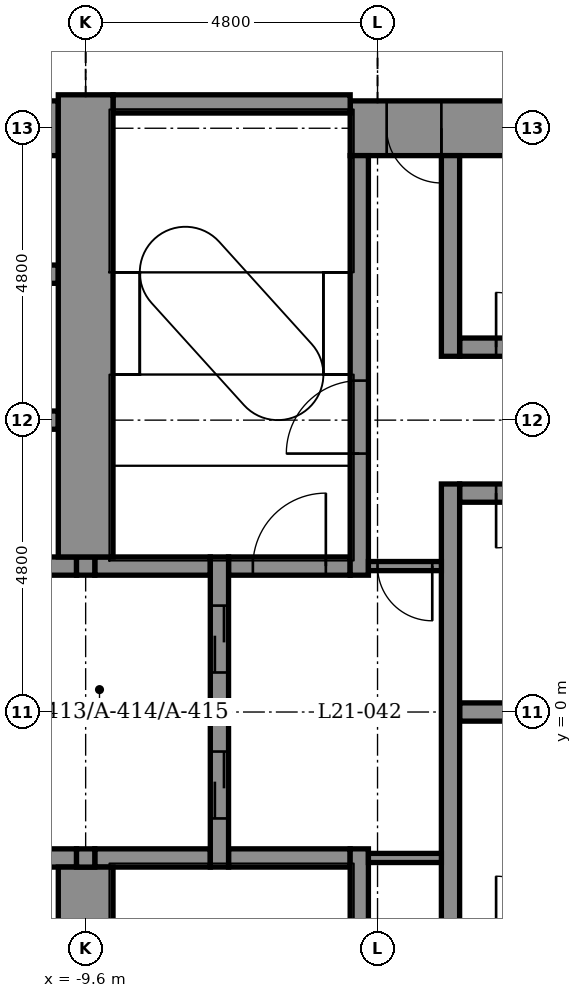
"""IFC4 building model, lengths in metres.
Left out: names, types, materials, properties, quantities, classifications, styles, units other than length and angle.
Written with IfcOpenShell. Run it as: python <this file> out.ifc"""

import sys

from ifc_helpers import new_model, si_unit, direction, frame, frame_2d, origin, place, context, subcontext, project, spatial, rectangle, extrude, element, fill, save


model = new_model("IFC4")
c1 = context("Model", 3, precision=1e-05, world=origin(), true_north=direction((0.0, 1.0)))
c2 = subcontext(c1, "Body", "Model", "MODEL_VIEW")
j1 = project(units=[si_unit("LENGTHUNIT", "METRE"), si_unit("PLANEANGLEUNIT", "RADIAN")], contexts=[c1])
p1 = place(None, origin())
s1 = spatial("IfcSite", under=j1, at=p1, CompositionType="ELEMENT")
p2 = place(p1, origin())
s2 = spatial("IfcBuilding", under=s1, at=p2, CompositionType="ELEMENT")
p3 = place(p2, frame((0.0, 0.0, 109.4)))
s3 = spatial("IfcBuildingStorey", under=s2, at=p3, CompositionType="ELEMENT", Elevation=109.4)
p4 = place(p3, frame((-10.85, -2.4, -0.2), z_axis=(0.0, 0.0, 1.0), x_axis=(1.0, 0.0, 0.0)))
e1 = element("IfcWall", 1, at=p4, inside=s3, PredefinedType="STANDARD", context=c2, shape_type="SweptSolid", body=[
    extrude(rectangle(XDim=1.1, YDim=0.3, at=frame_2d((0.55, 0.0))), origin(), (0.0, 0.0, 1.0), 4.5),
])
p5 = place(p3, frame((-9.45, -2.4, -0.2), z_axis=(0.0, 0.0, 1.0), x_axis=(1.0, 0.0, 0.0)))
e2 = element("IfcWall", 2, at=p5, inside=s3, PredefinedType="STANDARD", context=c2, shape_type="SweptSolid", body=[
    extrude(rectangle(XDim=1.9, YDim=0.3, at=frame_2d((0.95, 0.0))), origin(), (0.0, 0.0, 1.0), 4.5),
])
p6 = place(p3, frame((-7.25, -2.4, -0.2), z_axis=(0.0, 0.0, 1.0), x_axis=(1.0, 0.0, 0.0)))
e3 = element("IfcWall", 3, at=p6, inside=s3, PredefinedType="STANDARD", context=c2, shape_type="SweptSolid", body=[
    extrude(rectangle(XDim=2.0, YDim=0.3, at=frame_2d((1.0, 0.0))), origin(), (0.0, 0.0, 1.0), 4.5),
])
p7 = place(p3, frame((-10.85, 0.0, -0.2), z_axis=(0.0, 0.0, 1.0), x_axis=(1.0, 0.0, 0.0)))
e4 = element("IfcWall", 4, at=p7, inside=s3, PredefinedType="STANDARD", context=c2, shape_type="SweptSolid", body=[
    extrude(rectangle(XDim=3.3, YDim=0.3, at=frame_2d((1.65, 0.0))), origin(), (0.0, 0.0, 1.0), 4.5),
])
p8 = place(p3, frame((-3.45, 0.0, -0.2), z_axis=(0.0, 0.0, 1.0), x_axis=(1.0, 0.0, 0.0)))
e5 = element("IfcWall", 5, at=p8, inside=s3, PredefinedType="STANDARD", context=c2, shape_type="SweptSolid", body=[
    extrude(rectangle(XDim=2.1, YDim=0.3, at=frame_2d((1.05, 0.0))), origin(), (0.0, 0.0, 1.0), 4.5),
])
p9 = place(p3, frame((-10.85, 2.4, -0.2), z_axis=(0.0, 0.0, 1.0), x_axis=(1.0, 0.0, 0.0)))
e6 = element("IfcWall", 6, at=p9, inside=s3, PredefinedType="STANDARD", context=c2, shape_type="SweptSolid", body=[
    extrude(rectangle(XDim=1.1, YDim=0.3, at=frame_2d((0.55, 0.0))), origin(), (0.0, 0.0, 1.0), 4.5),
])
p10 = place(p3, frame((-9.45, 2.4, -0.2), z_axis=(0.0, 0.0, 1.0), x_axis=(1.0, 0.0, 0.0)))
e7 = element("IfcWall", 7, at=p10, inside=s3, PredefinedType="STANDARD", context=c2, shape_type="SweptSolid", body=[
    extrude(rectangle(XDim=1.9, YDim=0.3, at=frame_2d((0.95, 0.0))), origin(), (0.0, 0.0, 1.0), 4.5),
])
p11 = place(p3, frame((-7.25, 2.4, -0.2), z_axis=(0.0, 0.0, 1.0), x_axis=(1.0, 0.0, 0.0)))
e8 = element("IfcWall", 8, at=p11, inside=s3, PredefinedType="STANDARD", context=c2, shape_type="SweptSolid", body=[
    extrude(rectangle(XDim=2.0, YDim=0.3, at=frame_2d((1.0, 0.0))), origin(), (0.0, 0.0, 1.0), 4.5),
])
p12 = place(p11, frame((0.4, 0.0, 0.2)))
e9 = element("IfcOpeningElement", 9, at=p12, cuts=e8, PredefinedType="OPENING", context=c2, shape_type="SweptSolid", body=[
    extrude(rectangle(XDim=1.2, YDim=2.1, at=frame_2d((0.6, 1.05))), frame((0.0, 0.16, 0.0), z_axis=(0.0, -1.0, 0.0), x_axis=(1.0, 0.0, 0.0)), (0.0, 0.0, 1.0), 0.32),
])
p13 = place(p3, frame((-3.45, 3.6, -0.2), z_axis=(0.0, 0.0, 1.0), x_axis=(1.0, 0.0, 0.0)))
e10 = element("IfcWall", 10, at=p13, inside=s3, PredefinedType="STANDARD", context=c2, shape_type="SweptSolid", body=[
    extrude(rectangle(XDim=2.1, YDim=0.3, at=frame_2d((1.05, 0.0))), origin(), (0.0, 0.0, 1.0), 4.5),
])
p14 = place(p13, frame((0.6, 0.0, 0.2)))
e11 = element("IfcOpeningElement", 11, at=p14, cuts=e10, PredefinedType="OPENING", context=c2, shape_type="SweptSolid", body=[
    extrude(rectangle(XDim=0.9, YDim=2.1, at=frame_2d((0.45, 1.05))), frame((0.0, 0.16, 0.0), z_axis=(0.0, -1.0, 0.0), x_axis=(1.0, 0.0, 0.0)), (0.0, 0.0, 1.0), 0.32),
])
p15 = place(p3, frame((-13.95, 4.8, -0.2), z_axis=(0.0, 0.0, 1.0), x_axis=(1.0, 0.0, 0.0)))
e12 = element("IfcWall", 12, at=p15, inside=s3, PredefinedType="STANDARD", context=c2, shape_type="SweptSolid", body=[
    extrude(rectangle(XDim=3.9, YDim=0.3, at=frame_2d((1.95, 0.0))), origin(), (0.0, 0.0, 1.0), 4.5),
])
p16 = place(p3, frame((-3.45, 6.0, -0.2), z_axis=(0.0, 0.0, 1.0), x_axis=(1.0, 0.0, 0.0)))
e13 = element("IfcWall", 13, at=p16, inside=s3, PredefinedType="STANDARD", context=c2, shape_type="SweptSolid", body=[
    extrude(rectangle(XDim=2.1, YDim=0.3, at=frame_2d((1.05, 0.0))), origin(), (0.0, 0.0, 1.0), 4.5),
])
p17 = place(p16, frame((0.6, 0.0, 0.2)))
e14 = element("IfcOpeningElement", 14, at=p17, cuts=e13, PredefinedType="OPENING", context=c2, shape_type="SweptSolid", body=[
    extrude(rectangle(XDim=0.9, YDim=2.1, at=frame_2d((0.45, 1.05))), frame((0.0, 0.16, 0.0), z_axis=(0.0, -1.0, 0.0), x_axis=(1.0, 0.0, 0.0)), (0.0, 0.0, 1.0), 0.32),
])
p18 = place(p3, frame((-13.95, 7.2, -0.2), z_axis=(0.0, 0.0, 1.0), x_axis=(1.0, 0.0, 0.0)))
e15 = element("IfcWall", 15, at=p18, inside=s3, PredefinedType="STANDARD", context=c2, shape_type="SweptSolid", body=[
    extrude(rectangle(XDim=3.9, YDim=0.3, at=frame_2d((1.95, 0.0))), origin(), (0.0, 0.0, 1.0), 4.5),
])
p19 = place(p3, frame((-13.95, 9.6, -0.2), z_axis=(0.0, 0.0, 1.0), x_axis=(1.0, 0.0, 0.0)))
e16 = element("IfcWall", 16, at=p19, inside=s3, PredefinedType="SHEAR", context=c2, shape_type="SweptSolid", body=[
    extrude(rectangle(XDim=3.9, YDim=0.9, at=frame_2d((1.95, 0.0))), origin(), (0.0, 0.0, 1.0), 4.5),
])
p20 = place(p19, frame((0.05, 0.0, 0.2)))
e17 = element("IfcOpeningElement", 17, at=p20, cuts=e16, PredefinedType="OPENING", context=c2, shape_type="SweptSolid", body=[
    extrude(rectangle(XDim=0.9, YDim=2.1, at=frame_2d((0.45, 1.05))), frame((0.0, 0.46, 0.0), z_axis=(0.0, -1.0, 0.0), x_axis=(1.0, 0.0, 0.0)), (0.0, 0.0, 1.0), 0.92),
])
p21 = place(p19, frame((2.3, 0.0, 0.2)))
e18 = element("IfcOpeningElement", 18, at=p21, cuts=e16, PredefinedType="OPENING", context=c2, shape_type="SweptSolid", body=[
    extrude(rectangle(XDim=0.9, YDim=2.1, at=frame_2d((0.45, 1.05))), frame((0.0, 0.46, 0.0), z_axis=(0.0, -1.0, 0.0), x_axis=(1.0, 0.0, 0.0)), (0.0, 0.0, 1.0), 0.92),
])
p22 = place(p3, frame((-5.25, 9.6, -0.2), z_axis=(0.0, 0.0, 1.0), x_axis=(1.0, 0.0, 0.0)))
e19 = element("IfcWall", 19, at=p22, inside=s3, PredefinedType="SHEAR", context=c2, shape_type="SweptSolid", body=[
    extrude(rectangle(XDim=14.4, YDim=0.9, at=frame_2d((7.2, 0.0))), origin(), (0.0, 0.0, 1.0), 4.5),
])
p23 = place(p22, frame((0.6, 0.0, 0.2)))
e20 = element("IfcOpeningElement", 20, at=p23, cuts=e19, PredefinedType="OPENING", context=c2, shape_type="SweptSolid", body=[
    extrude(rectangle(XDim=0.9, YDim=2.1, at=frame_2d((0.45, 1.05))), frame((0.0, 0.46, 0.0), z_axis=(0.0, -1.0, 0.0), x_axis=(1.0, 0.0, 0.0)), (0.0, 0.0, 1.0), 0.92),
])
p24 = place(p3, frame((-9.15, 10.0, -0.2), z_axis=(0.0, 0.0, 1.0), x_axis=(1.0, 0.0, 0.0)))
e21 = element("IfcWall", 21, at=p24, inside=s3, PredefinedType="STANDARD", context=c2, shape_type="SweptSolid", body=[
    extrude(rectangle(XDim=3.9, YDim=0.3, at=frame_2d((1.95, 0.0))), origin(), (0.0, 0.0, 1.0), 4.5),
])
p25 = place(p3, frame((-9.6, -10.15, -0.2), z_axis=(0.0, 0.0, 1.0), x_axis=(0.0, 1.0, 0.0)))
e22 = element("IfcWall", 22, at=p25, inside=s3, PredefinedType="SHEAR", context=c2, shape_type="SweptSolid", body=[
    extrude(rectangle(XDim=7.6, YDim=0.9, at=frame_2d((3.8, 0.0))), origin(), (0.0, 0.0, 1.0), 4.5),
])
for number, where, z_axis, x_axis in (
    (23, (-9.6, -2.55, -0.2), (0.0, 0.0, 1.0), (0.0, 1.0, 0.0)),
    (24, (-9.6, 2.25, -0.2), (0.0, 0.0, 1.0), (0.0, 1.0, 0.0)),
):
    element("IfcWall", number, at=place(p3, frame(where, z_axis=z_axis, x_axis=x_axis)), inside=s3, PredefinedType="STANDARD", context=c2, shape_type="SweptSolid", body=[
        extrude(rectangle(XDim=0.3, YDim=0.3, at=frame_2d((0.15, 0.0))), origin(), (0.0, 0.0, 1.0), 4.5),
    ])
p26 = place(p3, frame((-9.6, 2.55, -0.2), z_axis=(0.0, 0.0, 1.0), x_axis=(0.0, 1.0, 0.0)))
e25 = element("IfcWall", 25, at=p26, inside=s3, PredefinedType="SHEAR", context=c2, shape_type="SweptSolid", body=[
    extrude(rectangle(XDim=7.6, YDim=0.9, at=frame_2d((3.8, 0.0))), origin(), (0.0, 0.0, 1.0), 4.5),
])
p27 = place(p3, frame((-7.4, -2.55, -0.2), z_axis=(0.0, 0.0, 1.0), x_axis=(0.0, 1.0, 0.0)))
e26 = element("IfcWall", 26, at=p27, inside=s3, PredefinedType="STANDARD", context=c2, shape_type="SweptSolid", body=[
    extrude(rectangle(XDim=5.1, YDim=0.3, at=frame_2d((2.55, 0.0))), origin(), (0.0, 0.0, 1.0), 4.5),
])
p28 = place(p27, frame((0.8, 0.0, 0.2)))
e27 = element("IfcOpeningElement", 27, at=p28, cuts=e26, PredefinedType="OPENING", context=c2, shape_type="SweptSolid", body=[
    extrude(rectangle(XDim=1.1, YDim=2.1, at=frame_2d((0.55, 1.05))), frame((0.0, 0.16, 0.0), z_axis=(0.0, -1.0, 0.0), x_axis=(1.0, 0.0, 0.0)), (0.0, 0.0, 1.0), 0.32),
])
p29 = place(p27, frame((3.2, 0.0, 0.2)))
e28 = element("IfcOpeningElement", 28, at=p29, cuts=e26, PredefinedType="OPENING", context=c2, shape_type="SweptSolid", body=[
    extrude(rectangle(XDim=1.1, YDim=2.1, at=frame_2d((0.55, 1.05))), frame((0.0, 0.16, 0.0), z_axis=(0.0, -1.0, 0.0), x_axis=(1.0, 0.0, 0.0)), (0.0, 0.0, 1.0), 0.32),
])
p30 = place(p3, frame((-5.1, -9.15, -0.2), z_axis=(0.0, 0.0, 1.0), x_axis=(0.0, 1.0, 0.0)))
e29 = element("IfcWall", 29, at=p30, inside=s3, PredefinedType="STANDARD", context=c2, shape_type="SweptSolid", body=[
    extrude(rectangle(XDim=6.9, YDim=0.3, at=frame_2d((3.45, 0.0))), origin(), (0.0, 0.0, 1.0), 4.5),
])
p31 = place(p30, frame((3.7, 0.0, 0.2)))
e30 = element("IfcOpeningElement", 30, at=p31, cuts=e29, PredefinedType="OPENING", context=c2, shape_type="SweptSolid", body=[
    extrude(rectangle(XDim=1.2, YDim=2.1, at=frame_2d((0.6, 1.05))), frame((0.0, 0.16, 0.0), z_axis=(0.0, -1.0, 0.0), x_axis=(1.0, 0.0, 0.0)), (0.0, 0.0, 1.0), 0.32),
])
p32 = place(p3, frame((-5.1, 2.25, -0.2), z_axis=(0.0, 0.0, 1.0), x_axis=(0.0, 1.0, 0.0)))
e31 = element("IfcWall", 31, at=p32, inside=s3, PredefinedType="STANDARD", context=c2, shape_type="SweptSolid", body=[
    extrude(rectangle(XDim=6.9, YDim=0.3, at=frame_2d((3.45, 0.0))), origin(), (0.0, 0.0, 1.0), 4.5),
])
p33 = place(p32, frame((2.0, 0.0, 0.2)))
e32 = element("IfcOpeningElement", 32, at=p33, cuts=e31, PredefinedType="OPENING", context=c2, shape_type="SweptSolid", body=[
    extrude(rectangle(XDim=1.2, YDim=2.1, at=frame_2d((0.6, 1.05))), frame((0.0, 0.16, 0.0), z_axis=(0.0, -1.0, 0.0), x_axis=(1.0, 0.0, 0.0)), (0.0, 0.0, 1.0), 0.32),
])
p34 = place(p3, frame((-3.6, -3.75, -0.2), z_axis=(0.0, 0.0, 1.0), x_axis=(0.0, 1.0, 0.0)))
e33 = element("IfcWall", 33, at=p34, inside=s3, PredefinedType="STANDARD", context=c2, shape_type="SweptSolid", body=[
    extrude(rectangle(XDim=7.5, YDim=0.3, at=frame_2d((3.75, 0.0))), origin(), (0.0, 0.0, 1.0), 4.5),
])
p35 = place(p3, frame((-3.6, 5.85, -0.2), z_axis=(0.0, 0.0, 1.0), x_axis=(0.0, 1.0, 0.0)))
e34 = element("IfcWall", 34, at=p35, inside=s3, PredefinedType="STANDARD", context=c2, shape_type="SweptSolid", body=[
    extrude(rectangle(XDim=3.3, YDim=0.3, at=frame_2d((1.65, 0.0))), origin(), (0.0, 0.0, 1.0), 4.5),
])
p36 = place(p3, frame((-4.95, 2.4, 0.0), z_axis=(0.0, 0.0, 1.0), x_axis=(1.0, 0.0, 0.0)))
e35 = element("IfcWall", 35, at=p36, inside=s3, PredefinedType="PARTITIONING", context=c2, shape_type="SweptSolid", body=[
    extrude(rectangle(XDim=1.2, YDim=0.15, at=frame_2d((0.6, 0.0))), origin(), (0.0, 0.0, 1.0), 4.3),
])
p37 = place(p36, frame((0.15, 0.0, 0.0)))
e36 = element("IfcOpeningElement", 36, at=p37, cuts=e35, PredefinedType="OPENING", context=c2, shape_type="SweptSolid", body=[
    extrude(rectangle(XDim=0.9, YDim=2.1, at=frame_2d((0.45, 1.05))), frame((0.0, 0.085, 0.0), z_axis=(0.0, -1.0, 0.0), x_axis=(1.0, 0.0, 0.0)), (0.0, 0.0, 1.0), 0.17),
])
p38 = place(p3, frame((-4.95, -2.4, 0.0), z_axis=(0.0, 0.0, 1.0), x_axis=(1.0, 0.0, 0.0)))
e37 = element("IfcWall", 37, at=p38, inside=s3, PredefinedType="PARTITIONING", context=c2, shape_type="SweptSolid", body=[
    extrude(rectangle(XDim=1.2, YDim=0.15, at=frame_2d((0.6, 0.0))), origin(), (0.0, 0.0, 1.0), 4.3),
])
p39 = place(p28, origin())
e38 = element("IfcDoor", 38, at=p39, inside=s3, OperationType="DOUBLE_DOOR_SLIDING", PredefinedType="DOOR", context=c2, shape_type="SweptSolid", body=[
    extrude(rectangle(XDim=1.1, YDim=2.1, at=frame_2d((0.55, 1.05))), frame((0.0, 0.025, 0.0), z_axis=(0.0, -1.0, 0.0), x_axis=(1.0, 0.0, 0.0)), (0.0, 0.0, 1.0), 0.05),
])
fill(e27, e38)
p40 = place(p29, origin())
e39 = element("IfcDoor", 39, at=p40, inside=s3, OperationType="DOUBLE_DOOR_SLIDING", PredefinedType="DOOR", context=c2, shape_type="SweptSolid", body=[
    extrude(rectangle(XDim=1.1, YDim=2.1, at=frame_2d((0.55, 1.05))), frame((0.0, 0.025, 0.0), z_axis=(0.0, -1.0, 0.0), x_axis=(1.0, 0.0, 0.0)), (0.0, 0.0, 1.0), 0.05),
])
fill(e28, e39)
p41 = place(p33, origin())
e40 = element("IfcDoor", 40, at=p41, inside=s3, OperationType="SINGLE_SWING_LEFT", PredefinedType="DOOR", context=c2, shape_type="SweptSolid", body=[
    extrude(rectangle(XDim=1.2, YDim=2.1, at=frame_2d((0.6, 1.05))), frame((0.0, 0.025, 0.0), z_axis=(0.0, -1.0, 0.0), x_axis=(1.0, 0.0, 0.0)), (0.0, 0.0, 1.0), 0.05),
])
fill(e32, e40)
p42 = place(p17, origin())
e41 = element("IfcDoor", 41, at=p42, inside=s3, OperationType="SINGLE_SWING_LEFT", PredefinedType="DOOR", context=c2, shape_type="SweptSolid", body=[
    extrude(rectangle(XDim=0.9, YDim=2.1, at=frame_2d((0.45, 1.05))), frame((0.0, 0.025, 0.0), z_axis=(0.0, -1.0, 0.0), x_axis=(1.0, 0.0, 0.0)), (0.0, 0.0, 1.0), 0.05),
])
fill(e14, e41)
p43 = place(p14, frame((0.9, 0.0, 0.0), z_axis=(0.0, 0.0, 1.0), x_axis=(-1.0, 0.0, 0.0)))
e42 = element("IfcDoor", 42, at=p43, inside=s3, OperationType="SINGLE_SWING_LEFT", PredefinedType="DOOR", context=c2, shape_type="SweptSolid", body=[
    extrude(rectangle(XDim=0.9, YDim=2.1, at=frame_2d((0.45, 1.05))), frame((0.0, 0.025, 0.0), z_axis=(0.0, -1.0, 0.0), x_axis=(1.0, 0.0, 0.0)), (0.0, 0.0, 1.0), 0.05),
])
fill(e11, e42)
p44 = place(p23, frame((0.9, 0.0, 0.0), z_axis=(0.0, 0.0, 1.0), x_axis=(-1.0, 0.0, 0.0)))
e43 = element("IfcDoor", 43, at=p44, inside=s3, OperationType="SINGLE_SWING_RIGHT", PredefinedType="DOOR", context=c2, shape_type="SweptSolid", body=[
    extrude(rectangle(XDim=0.9, YDim=2.1, at=frame_2d((0.45, 1.05))), frame((0.0, 0.025, 0.0), z_axis=(0.0, -1.0, 0.0), x_axis=(1.0, 0.0, 0.0)), (0.0, 0.0, 1.0), 0.05),
])
fill(e20, e43)
p45 = place(p37, frame((0.9, 0.0, 0.0), z_axis=(0.0, 0.0, 1.0), x_axis=(-1.0, 0.0, 0.0)))
e44 = element("IfcDoor", 44, at=p45, inside=s3, OperationType="SINGLE_SWING_RIGHT", PredefinedType="DOOR", context=c2, shape_type="SweptSolid", body=[
    extrude(rectangle(XDim=0.9, YDim=2.1, at=frame_2d((0.45, 1.05))), frame((0.0, 0.025, 0.0), z_axis=(0.0, -1.0, 0.0), x_axis=(1.0, 0.0, 0.0)), (0.0, 0.0, 1.0), 0.05),
])
fill(e36, e44)
p46 = place(p12, origin())
e45 = element("IfcDoor", 45, at=p46, inside=s3, OperationType="SINGLE_SWING_RIGHT", PredefinedType="DOOR", context=c2, shape_type="SweptSolid", body=[
    extrude(rectangle(XDim=1.2, YDim=2.1, at=frame_2d((0.6, 1.05))), frame((0.0, 0.025, 0.0), z_axis=(0.0, -1.0, 0.0), x_axis=(1.0, 0.0, 0.0)), (0.0, 0.0, 1.0), 0.05),
])
fill(e9, e45)
save(model, sys.argv[1])
